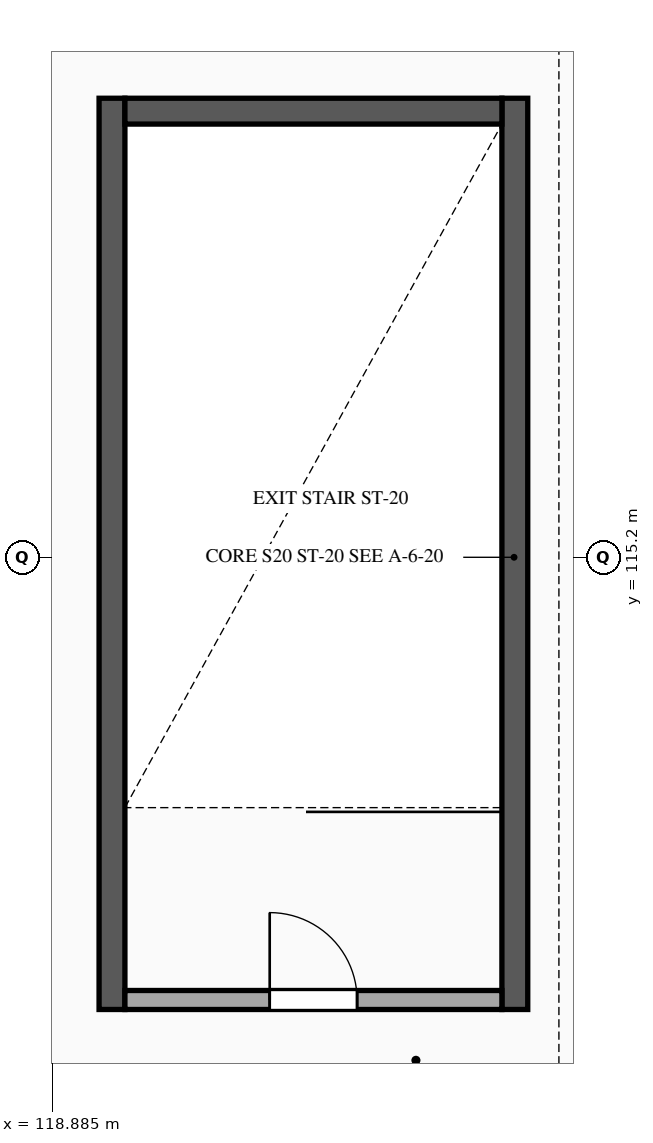
"""IFC4 building model, lengths in metres.
Left out: names, types, materials, properties, quantities, classifications, styles, units other than length and angle.
Written with IfcOpenShell. Run it as: python <this file> out.ifc"""

import sys

from ifc_helpers import new_model, si_unit, direction, frame, frame_2d, origin, place, context, subcontext, project, spatial, rectangle, extrude, element, fill, save


model = new_model("IFC4")
c1 = context("Model", 3, precision=1e-05, world=origin(), true_north=direction((0.0, 1.0)))
c2 = subcontext(c1, "Body", "Model", "MODEL_VIEW")
j1 = project(units=[si_unit("LENGTHUNIT", "METRE"), si_unit("PLANEANGLEUNIT", "RADIAN")], contexts=[c1])
p1 = place(None, origin())
s1 = spatial("IfcSite", under=j1, at=p1, CompositionType="ELEMENT")
p2 = place(p1, origin())
s2 = spatial("IfcBuilding", under=s1, at=p2, CompositionType="ELEMENT")
p3 = place(p2, frame((0.0, 0.0, 15.3)))
s3 = spatial("IfcBuildingStorey", under=s2, at=p3, CompositionType="ELEMENT", Elevation=15.3)
for number, where, z_axis, x_axis in (
    (1, (119.67, 109.25, 0.0), (0.0, 0.0, 1.0), (0.0, 1.0, 0.0)),
    (2, (124.97, 121.24, 0.0), (0.0, 0.0, 1.0), (0.0, -1.0, 0.0)),
):
    element("IfcWall", number, at=place(p3, frame(where, z_axis=z_axis, x_axis=x_axis)), inside=s3, PredefinedType="SHEAR", context=c2, shape_type="SweptSolid", body=[
        extrude(rectangle(XDim=11.99, YDim=0.34, at=frame_2d((5.995, 0.0))), origin(), (0.0, 0.0, 1.0), 4.26),
    ])
p4 = place(p3, frame((119.84, 121.07, 0.0), z_axis=(0.0, 0.0, 1.0), x_axis=(1.0, 0.0, 0.0)))
e3 = element("IfcWall", 3, at=p4, inside=s3, PredefinedType="SHEAR", context=c2, shape_type="SweptSolid", body=[
    extrude(rectangle(XDim=4.96, YDim=0.34, at=frame_2d((2.48, 0.0))), origin(), (0.0, 0.0, 1.0), 4.26),
])
p5 = place(p3, frame((119.84, 109.375, 0.0), z_axis=(0.0, 0.0, 1.0), x_axis=(1.0, 0.0, 0.0)))
e4 = element("IfcWall", 4, at=p5, inside=s3, PredefinedType="STANDARD", context=c2, shape_type="SweptSolid", body=[
    extrude(rectangle(XDim=4.96, YDim=0.25, at=frame_2d((2.48, 0.0))), origin(), (0.0, 0.0, 1.0), 4.25),
])
p6 = place(p5, frame((1.905, 0.0, 0.0)))
e5 = element("IfcOpeningElement", 5, at=p6, cuts=e4, PredefinedType="OPENING", context=c2, shape_type="SweptSolid", body=[
    extrude(rectangle(XDim=1.15, YDim=2.2, at=frame_2d((0.575, 1.1))), frame((0.0, 0.135, 0.0), z_axis=(0.0, -1.0, 0.0), x_axis=(1.0, 0.0, 0.0)), (0.0, 0.0, 1.0), 0.27),
])
p7 = place(p6, origin())
e6 = element("IfcDoor", 6, at=p7, inside=s3, OperationType="SINGLE_SWING_LEFT", PredefinedType="DOOR", context=c2, shape_type="SweptSolid", body=[
    extrude(rectangle(XDim=1.15, YDim=2.2, at=frame_2d((0.575, 1.1))), frame((0.0, 0.025, 0.0), z_axis=(0.0, -1.0, 0.0), x_axis=(1.0, 0.0, 0.0)), (0.0, 0.0, 1.0), 0.05),
])
fill(e5, e6)
save(model, sys.argv[1])
